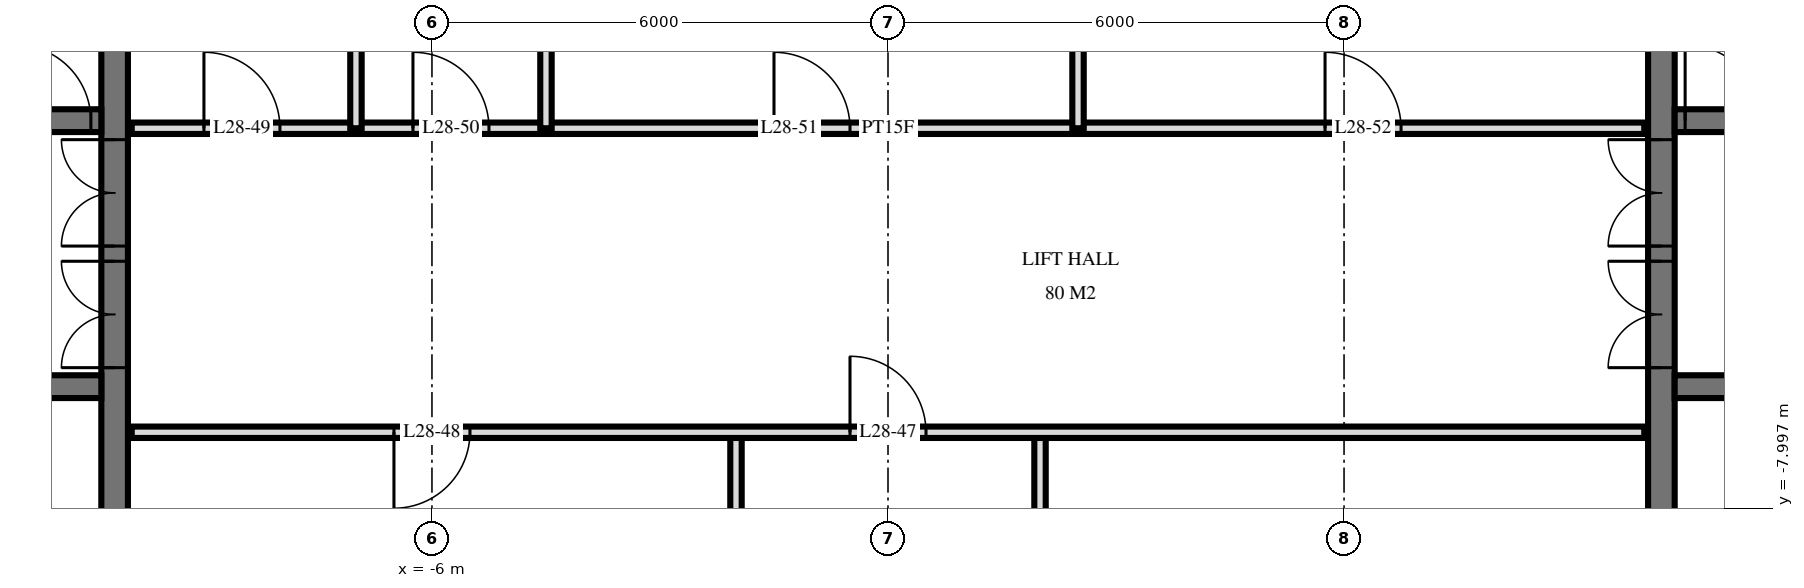
"""IFC4 building model, lengths in metres.
Left out: names, types, materials, properties, quantities, classifications, styles, units other than length and angle.
Written with IfcOpenShell. Run it as: python <this file> out.ifc"""

import sys

from ifc_helpers import new_model, si_unit, direction, frame, frame_2d, origin, place, context, subcontext, project, spatial, rectangle, extrude, element, fill, save


model = new_model("IFC4")
c1 = context("Model", 3, precision=1e-05, world=origin(), true_north=direction((0.0, 1.0)))
c2 = subcontext(c1, "Body", "Model", "MODEL_VIEW")
j1 = project(units=[si_unit("LENGTHUNIT", "METRE"), si_unit("PLANEANGLEUNIT", "RADIAN")], contexts=[c1])
p1 = place(None, origin())
s1 = spatial("IfcSite", under=j1, at=p1, CompositionType="ELEMENT")
p2 = place(p1, origin())
s2 = spatial("IfcBuilding", under=s1, at=p2, CompositionType="ELEMENT")
p3 = place(p2, frame((0.0, 0.0, 112.8)))
s3 = spatial("IfcBuildingStorey", under=s2, at=p3, CompositionType="ELEMENT", Elevation=112.8)
p4 = place(p3, frame((-10.175, -14.55, 0.0), z_axis=(0.0, 0.0, 1.0), x_axis=(0.0, 1.0, 0.0)))
e1 = element("IfcWall", 1, at=p4, inside=s3, PredefinedType="SHEAR", context=c2, shape_type="SweptSolid", body=[
    extrude(rectangle(XDim=14.1, YDim=0.35, at=frame_2d((7.05, 0.0))), origin(), (0.0, 0.0, 1.0), 3.6),
])
p5 = place(p4, frame((8.4, 0.0, 0.0)))
e2 = element("IfcOpeningElement", 2, at=p5, cuts=e1, PredefinedType="OPENING", context=c2, shape_type="SweptSolid", body=[
    extrude(rectangle(XDim=1.4, YDim=2.4, at=frame_2d((0.7, 1.2))), frame((0.0, 0.185, 0.0), z_axis=(0.0, -1.0, 0.0), x_axis=(1.0, 0.0, 0.0)), (0.0, 0.0, 1.0), 0.37),
])
p6 = place(p4, frame((10.0, 0.0, 0.0)))
e3 = element("IfcOpeningElement", 3, at=p6, cuts=e1, PredefinedType="OPENING", context=c2, shape_type="SweptSolid", body=[
    extrude(rectangle(XDim=1.4, YDim=2.4, at=frame_2d((0.7, 1.2))), frame((0.0, 0.185, 0.0), z_axis=(0.0, -1.0, 0.0), x_axis=(1.0, 0.0, 0.0)), (0.0, 0.0, 1.0), 0.37),
])
p7 = place(p4, frame((4.0, 0.0, 0.0)))
e4 = element("IfcOpeningElement", 4, at=p7, cuts=e1, PredefinedType="OPENING", context=c2, shape_type="SweptSolid", body=[
    extrude(rectangle(XDim=1.2, YDim=2.1, at=frame_2d((0.6, 1.05))), frame((0.0, 0.185, 0.0), z_axis=(0.0, -1.0, 0.0), x_axis=(1.0, 0.0, 0.0)), (0.0, 0.0, 1.0), 0.37),
])
p8 = place(p3, frame((-24.05, -2.9, 0.0), z_axis=(0.0, 0.0, 1.0), x_axis=(1.0, 0.0, 0.0)))
e5 = element("IfcWall", 5, at=p8, inside=s3, PredefinedType="SHEAR", context=c2, shape_type="SweptSolid", body=[
    extrude(rectangle(XDim=13.7, YDim=0.3, at=frame_2d((6.85, 0.0))), origin(), (0.0, 0.0, 1.0), 3.6),
])
p9 = place(p8, frame((0.55, 0.0, 0.0)))
e6 = element("IfcOpeningElement", 6, at=p9, cuts=e5, PredefinedType="OPENING", context=c2, shape_type="SweptSolid", body=[
    extrude(rectangle(XDim=1.1, YDim=2.1, at=frame_2d((0.55, 1.05))), frame((0.0, 0.16, 0.0), z_axis=(0.0, -1.0, 0.0), x_axis=(1.0, 0.0, 0.0)), (0.0, 0.0, 1.0), 0.32),
])
p10 = place(p8, frame((6.613, 0.0, 0.0)))
e7 = element("IfcOpeningElement", 7, at=p10, cuts=e5, PredefinedType="OPENING", context=c2, shape_type="SweptSolid", body=[
    extrude(rectangle(XDim=0.9, YDim=2.1, at=frame_2d((0.45, 1.05))), frame((0.0, 0.16, 0.0), z_axis=(0.0, -1.0, 0.0), x_axis=(1.0, 0.0, 0.0)), (0.0, 0.0, 1.0), 0.32),
])
p11 = place(p8, frame((5.188, 0.0, 0.0)))
e8 = element("IfcOpeningElement", 8, at=p11, cuts=e5, PredefinedType="OPENING", context=c2, shape_type="SweptSolid", body=[
    extrude(rectangle(XDim=0.9, YDim=2.1, at=frame_2d((0.45, 1.05))), frame((0.0, 0.16, 0.0), z_axis=(0.0, -1.0, 0.0), x_axis=(1.0, 0.0, 0.0)), (0.0, 0.0, 1.0), 0.32),
])
p12 = place(p8, frame((12.562, 0.0, 0.0)))
e9 = element("IfcOpeningElement", 9, at=p12, cuts=e5, PredefinedType="OPENING", context=c2, shape_type="SweptSolid", body=[
    extrude(rectangle(XDim=1.0, YDim=2.1, at=frame_2d((0.5, 1.05))), frame((0.0, 0.16, 0.0), z_axis=(0.0, -1.0, 0.0), x_axis=(1.0, 0.0, 0.0)), (0.0, 0.0, 1.0), 0.32),
])
p13 = place(p8, frame((11.137, 0.0, 0.0)))
e10 = element("IfcOpeningElement", 10, at=p13, cuts=e5, PredefinedType="OPENING", context=c2, shape_type="SweptSolid", body=[
    extrude(rectangle(XDim=1.0, YDim=2.1, at=frame_2d((0.5, 1.05))), frame((0.0, 0.16, 0.0), z_axis=(0.0, -1.0, 0.0), x_axis=(1.0, 0.0, 0.0)), (0.0, 0.0, 1.0), 0.32),
])
p14 = place(p8, frame((8.85, 0.0, 0.0)))
e11 = element("IfcOpeningElement", 11, at=p14, cuts=e5, PredefinedType="OPENING", context=c2, shape_type="SweptSolid", body=[
    extrude(rectangle(XDim=1.0, YDim=2.1, at=frame_2d((0.5, 1.05))), frame((0.0, 0.16, 0.0), z_axis=(0.0, -1.0, 0.0), x_axis=(1.0, 0.0, 0.0)), (0.0, 0.0, 1.0), 0.32),
])
p15 = place(p8, frame((3.0, 0.0, 0.0)))
e12 = element("IfcOpeningElement", 12, at=p15, cuts=e5, PredefinedType="OPENING", context=c2, shape_type="SweptSolid", body=[
    extrude(rectangle(XDim=1.0, YDim=2.1, at=frame_2d((0.5, 1.05))), frame((0.0, 0.16, 0.0), z_axis=(0.0, -1.0, 0.0), x_axis=(1.0, 0.0, 0.0)), (0.0, 0.0, 1.0), 0.32),
])
p16 = place(p3, frame((-24.05, -6.4, 0.0), z_axis=(0.0, 0.0, 1.0), x_axis=(1.0, 0.0, 0.0)))
e13 = element("IfcWall", 13, at=p16, inside=s3, PredefinedType="SHEAR", context=c2, shape_type="SweptSolid", body=[
    extrude(rectangle(XDim=13.7, YDim=0.3, at=frame_2d((6.85, 0.0))), origin(), (0.0, 0.0, 1.0), 3.6),
])
p17 = place(p16, frame((0.55, 0.0, 0.0)))
e14 = element("IfcOpeningElement", 14, at=p17, cuts=e13, PredefinedType="OPENING", context=c2, shape_type="SweptSolid", body=[
    extrude(rectangle(XDim=1.1, YDim=2.1, at=frame_2d((0.55, 1.05))), frame((0.0, 0.16, 0.0), z_axis=(0.0, -1.0, 0.0), x_axis=(1.0, 0.0, 0.0)), (0.0, 0.0, 1.0), 0.32),
])
p18 = place(p16, frame((5.8, 0.0, 0.0)))
e15 = element("IfcOpeningElement", 15, at=p18, cuts=e13, PredefinedType="OPENING", context=c2, shape_type="SweptSolid", body=[
    extrude(rectangle(XDim=1.1, YDim=2.1, at=frame_2d((0.55, 1.05))), frame((0.0, 0.16, 0.0), z_axis=(0.0, -1.0, 0.0), x_axis=(1.0, 0.0, 0.0)), (0.0, 0.0, 1.0), 0.32),
])
p19 = place(p3, frame((10.175, -14.55, 0.0), z_axis=(0.0, 0.0, 1.0), x_axis=(0.0, 1.0, 0.0)))
e16 = element("IfcWall", 16, at=p19, inside=s3, PredefinedType="SHEAR", context=c2, shape_type="SweptSolid", body=[
    extrude(rectangle(XDim=14.1, YDim=0.35, at=frame_2d((7.05, 0.0))), origin(), (0.0, 0.0, 1.0), 3.6),
])
p20 = place(p19, frame((8.4, 0.0, 0.0)))
e17 = element("IfcOpeningElement", 17, at=p20, cuts=e16, PredefinedType="OPENING", context=c2, shape_type="SweptSolid", body=[
    extrude(rectangle(XDim=1.4, YDim=2.4, at=frame_2d((0.7, 1.2))), frame((0.0, 0.185, 0.0), z_axis=(0.0, -1.0, 0.0), x_axis=(1.0, 0.0, 0.0)), (0.0, 0.0, 1.0), 0.37),
])
p21 = place(p19, frame((10.0, 0.0, 0.0)))
e18 = element("IfcOpeningElement", 18, at=p21, cuts=e16, PredefinedType="OPENING", context=c2, shape_type="SweptSolid", body=[
    extrude(rectangle(XDim=1.4, YDim=2.4, at=frame_2d((0.7, 1.2))), frame((0.0, 0.185, 0.0), z_axis=(0.0, -1.0, 0.0), x_axis=(1.0, 0.0, 0.0)), (0.0, 0.0, 1.0), 0.37),
])
p22 = place(p19, frame((4.0, 0.0, 0.0)))
e19 = element("IfcOpeningElement", 19, at=p22, cuts=e16, PredefinedType="OPENING", context=c2, shape_type="SweptSolid", body=[
    extrude(rectangle(XDim=1.2, YDim=2.1, at=frame_2d((0.6, 1.05))), frame((0.0, 0.185, 0.0), z_axis=(0.0, -1.0, 0.0), x_axis=(1.0, 0.0, 0.0)), (0.0, 0.0, 1.0), 0.37),
])
p23 = place(p3, frame((10.35, -2.9, 0.0), z_axis=(0.0, 0.0, 1.0), x_axis=(1.0, 0.0, 0.0)))
e20 = element("IfcWall", 20, at=p23, inside=s3, PredefinedType="SHEAR", context=c2, shape_type="SweptSolid", body=[
    extrude(rectangle(XDim=13.7, YDim=0.3, at=frame_2d((6.85, 0.0))), origin(), (0.0, 0.0, 1.0), 3.6),
])
p24 = place(p23, frame((12.05, 0.0, 0.0)))
e21 = element("IfcOpeningElement", 21, at=p24, cuts=e20, PredefinedType="OPENING", context=c2, shape_type="SweptSolid", body=[
    extrude(rectangle(XDim=1.1, YDim=2.1, at=frame_2d((0.55, 1.05))), frame((0.0, 0.16, 0.0), z_axis=(0.0, -1.0, 0.0), x_axis=(1.0, 0.0, 0.0)), (0.0, 0.0, 1.0), 0.32),
])
p25 = place(p23, frame((6.188, 0.0, 0.0)))
e22 = element("IfcOpeningElement", 22, at=p25, cuts=e20, PredefinedType="OPENING", context=c2, shape_type="SweptSolid", body=[
    extrude(rectangle(XDim=0.9, YDim=2.1, at=frame_2d((0.45, 1.05))), frame((0.0, 0.16, 0.0), z_axis=(0.0, -1.0, 0.0), x_axis=(1.0, 0.0, 0.0)), (0.0, 0.0, 1.0), 0.32),
])
p26 = place(p23, frame((7.613, 0.0, 0.0)))
e23 = element("IfcOpeningElement", 23, at=p26, cuts=e20, PredefinedType="OPENING", context=c2, shape_type="SweptSolid", body=[
    extrude(rectangle(XDim=0.9, YDim=2.1, at=frame_2d((0.45, 1.05))), frame((0.0, 0.16, 0.0), z_axis=(0.0, -1.0, 0.0), x_axis=(1.0, 0.0, 0.0)), (0.0, 0.0, 1.0), 0.32),
])
p27 = place(p23, frame((0.137, 0.0, 0.0)))
e24 = element("IfcOpeningElement", 24, at=p27, cuts=e20, PredefinedType="OPENING", context=c2, shape_type="SweptSolid", body=[
    extrude(rectangle(XDim=1.0, YDim=2.1, at=frame_2d((0.5, 1.05))), frame((0.0, 0.16, 0.0), z_axis=(0.0, -1.0, 0.0), x_axis=(1.0, 0.0, 0.0)), (0.0, 0.0, 1.0), 0.32),
])
p28 = place(p23, frame((1.562, 0.0, 0.0)))
e25 = element("IfcOpeningElement", 25, at=p28, cuts=e20, PredefinedType="OPENING", context=c2, shape_type="SweptSolid", body=[
    extrude(rectangle(XDim=1.0, YDim=2.1, at=frame_2d((0.5, 1.05))), frame((0.0, 0.16, 0.0), z_axis=(0.0, -1.0, 0.0), x_axis=(1.0, 0.0, 0.0)), (0.0, 0.0, 1.0), 0.32),
])
p29 = place(p23, frame((3.85, 0.0, 0.0)))
e26 = element("IfcOpeningElement", 26, at=p29, cuts=e20, PredefinedType="OPENING", context=c2, shape_type="SweptSolid", body=[
    extrude(rectangle(XDim=1.0, YDim=2.1, at=frame_2d((0.5, 1.05))), frame((0.0, 0.16, 0.0), z_axis=(0.0, -1.0, 0.0), x_axis=(1.0, 0.0, 0.0)), (0.0, 0.0, 1.0), 0.32),
])
p30 = place(p23, frame((9.7, 0.0, 0.0)))
e27 = element("IfcOpeningElement", 27, at=p30, cuts=e20, PredefinedType="OPENING", context=c2, shape_type="SweptSolid", body=[
    extrude(rectangle(XDim=1.0, YDim=2.1, at=frame_2d((0.5, 1.05))), frame((0.0, 0.16, 0.0), z_axis=(0.0, -1.0, 0.0), x_axis=(1.0, 0.0, 0.0)), (0.0, 0.0, 1.0), 0.32),
])
p31 = place(p3, frame((10.35, -6.4, 0.0), z_axis=(0.0, 0.0, 1.0), x_axis=(1.0, 0.0, 0.0)))
e28 = element("IfcWall", 28, at=p31, inside=s3, PredefinedType="SHEAR", context=c2, shape_type="SweptSolid", body=[
    extrude(rectangle(XDim=13.7, YDim=0.3, at=frame_2d((6.85, 0.0))), origin(), (0.0, 0.0, 1.0), 3.6),
])
p32 = place(p31, frame((12.05, 0.0, 0.0)))
e29 = element("IfcOpeningElement", 29, at=p32, cuts=e28, PredefinedType="OPENING", context=c2, shape_type="SweptSolid", body=[
    extrude(rectangle(XDim=1.1, YDim=2.1, at=frame_2d((0.55, 1.05))), frame((0.0, 0.16, 0.0), z_axis=(0.0, -1.0, 0.0), x_axis=(1.0, 0.0, 0.0)), (0.0, 0.0, 1.0), 0.32),
])
p33 = place(p31, frame((6.8, 0.0, 0.0)))
e30 = element("IfcOpeningElement", 30, at=p33, cuts=e28, PredefinedType="OPENING", context=c2, shape_type="SweptSolid", body=[
    extrude(rectangle(XDim=1.1, YDim=2.1, at=frame_2d((0.55, 1.05))), frame((0.0, 0.16, 0.0), z_axis=(0.0, -1.0, 0.0), x_axis=(1.0, 0.0, 0.0)), (0.0, 0.0, 1.0), 0.32),
])
p34 = place(p3, frame((2.5, -3.0, 0.0), z_axis=(0.0, 0.0, 1.0), x_axis=(0.0, 1.0, 0.0)))
e31 = element("IfcWall", 31, at=p34, inside=s3, PredefinedType="PARTITIONING", context=c2, shape_type="SweptSolid", body=[
    extrude(rectangle(XDim=4.02, YDim=0.15, at=frame_2d((2.01, 0.0))), origin(), (0.0, 0.0, 1.0), 3.32),
])
for number, where, z_axis, x_axis in (
    (32, (2.0, -11.0, 0.0), (0.0, 0.0, 1.0), (0.0, 1.0, 0.0)),
    (33, (-2.0, -11.0, 0.0), (0.0, 0.0, 1.0), (0.0, 1.0, 0.0)),
):
    element("IfcWall", number, at=place(p3, frame(where, z_axis=z_axis, x_axis=x_axis)), inside=s3, PredefinedType="PARTITIONING", context=c2, shape_type="SweptSolid", body=[
        extrude(rectangle(XDim=4.0, YDim=0.15, at=frame_2d((2.0, 0.0))), origin(), (0.0, 0.0, 1.0), 3.32),
    ])
for number, where, z_axis, x_axis in (
    (34, (-4.5, -3.0, 0.0), (0.0, 0.0, 1.0), (0.0, 1.0, 0.0)),
    (35, (-7.0, -3.0, 0.0), (0.0, 0.0, 1.0), (0.0, 1.0, 0.0)),
):
    element("IfcWall", number, at=place(p3, frame(where, z_axis=z_axis, x_axis=x_axis)), inside=s3, PredefinedType="PLUMBINGWALL", context=c2, shape_type="SweptSolid", body=[
        extrude(rectangle(XDim=4.02, YDim=0.15, at=frame_2d((2.01, 0.0))), origin(), (0.0, 0.0, 1.0), 3.32),
    ])
p35 = place(p3, frame((-9.95, -7.0, 0.0), z_axis=(0.0, 0.0, 1.0), x_axis=(1.0, 0.0, 0.0)))
e36 = element("IfcWall", 36, at=p35, inside=s3, PredefinedType="PARTITIONING", context=c2, shape_type="SweptSolid", body=[
    extrude(rectangle(XDim=19.9, YDim=0.15, at=frame_2d((9.95, 0.0))), origin(), (0.0, 0.0, 1.0), 3.32),
])
p36 = place(p35, frame((9.45, 0.0, 0.0)))
e37 = element("IfcOpeningElement", 37, at=p36, cuts=e36, PredefinedType="OPENING", context=c2, shape_type="SweptSolid", body=[
    extrude(rectangle(XDim=1.0, YDim=2.1, at=frame_2d((0.5, 1.05))), frame((0.0, 0.085, 0.0), z_axis=(0.0, -1.0, 0.0), x_axis=(1.0, 0.0, 0.0)), (0.0, 0.0, 1.0), 0.17),
])
p37 = place(p35, frame((3.45, 0.0, 0.0)))
e38 = element("IfcOpeningElement", 38, at=p37, cuts=e36, PredefinedType="OPENING", context=c2, shape_type="SweptSolid", body=[
    extrude(rectangle(XDim=1.0, YDim=2.1, at=frame_2d((0.5, 1.05))), frame((0.0, 0.085, 0.0), z_axis=(0.0, -1.0, 0.0), x_axis=(1.0, 0.0, 0.0)), (0.0, 0.0, 1.0), 0.17),
])
p38 = place(p3, frame((-9.95, -3.0, 0.0), z_axis=(0.0, 0.0, 1.0), x_axis=(1.0, 0.0, 0.0)))
e39 = element("IfcWall", 39, at=p38, inside=s3, PredefinedType="PARTITIONING", context=c2, shape_type="SweptSolid", body=[
    extrude(rectangle(XDim=19.9, YDim=0.15, at=frame_2d((9.95, 0.0))), origin(), (0.0, 0.0, 1.0), 3.32),
])
p39 = place(p38, frame((0.95, 0.0, 0.0)))
e40 = element("IfcOpeningElement", 40, at=p39, cuts=e39, PredefinedType="OPENING", context=c2, shape_type="SweptSolid", body=[
    extrude(rectangle(XDim=1.0, YDim=2.1, at=frame_2d((0.5, 1.05))), frame((0.0, 0.085, 0.0), z_axis=(0.0, -1.0, 0.0), x_axis=(1.0, 0.0, 0.0)), (0.0, 0.0, 1.0), 0.17),
])
p40 = place(p38, frame((3.7, 0.0, 0.0)))
e41 = element("IfcOpeningElement", 41, at=p40, cuts=e39, PredefinedType="OPENING", context=c2, shape_type="SweptSolid", body=[
    extrude(rectangle(XDim=1.0, YDim=2.1, at=frame_2d((0.5, 1.05))), frame((0.0, 0.085, 0.0), z_axis=(0.0, -1.0, 0.0), x_axis=(1.0, 0.0, 0.0)), (0.0, 0.0, 1.0), 0.17),
])
p41 = place(p38, frame((8.45, 0.0, 0.0)))
e42 = element("IfcOpeningElement", 42, at=p41, cuts=e39, PredefinedType="OPENING", context=c2, shape_type="SweptSolid", body=[
    extrude(rectangle(XDim=1.0, YDim=2.1, at=frame_2d((0.5, 1.05))), frame((0.0, 0.085, 0.0), z_axis=(0.0, -1.0, 0.0), x_axis=(1.0, 0.0, 0.0)), (0.0, 0.0, 1.0), 0.17),
])
p42 = place(p38, frame((15.7, 0.0, 0.0)))
e43 = element("IfcOpeningElement", 43, at=p42, cuts=e39, PredefinedType="OPENING", context=c2, shape_type="SweptSolid", body=[
    extrude(rectangle(XDim=1.0, YDim=2.1, at=frame_2d((0.5, 1.05))), frame((0.0, 0.085, 0.0), z_axis=(0.0, -1.0, 0.0), x_axis=(1.0, 0.0, 0.0)), (0.0, 0.0, 1.0), 0.17),
])
p43 = place(p5, origin())
e44 = element("IfcDoor", 44, at=p43, inside=s3, OperationType="DOUBLE_DOOR_SINGLE_SWING", PredefinedType="DOOR", context=c2, shape_type="SweptSolid", body=[
    extrude(rectangle(XDim=1.4, YDim=2.4, at=frame_2d((0.7, 1.2))), frame((0.0, 0.025, 0.0), z_axis=(0.0, -1.0, 0.0), x_axis=(1.0, 0.0, 0.0)), (0.0, 0.0, 1.0), 0.05),
])
fill(e2, e44)
p44 = place(p6, origin())
e45 = element("IfcDoor", 45, at=p44, inside=s3, OperationType="DOUBLE_DOOR_SINGLE_SWING", PredefinedType="DOOR", context=c2, shape_type="SweptSolid", body=[
    extrude(rectangle(XDim=1.4, YDim=2.4, at=frame_2d((0.7, 1.2))), frame((0.0, 0.025, 0.0), z_axis=(0.0, -1.0, 0.0), x_axis=(1.0, 0.0, 0.0)), (0.0, 0.0, 1.0), 0.05),
])
fill(e3, e45)
p45 = place(p12, origin())
e46 = element("IfcDoor", 46, at=p45, inside=s3, OperationType="SINGLE_SWING_RIGHT", PredefinedType="DOOR", context=c2, shape_type="SweptSolid", body=[
    extrude(rectangle(XDim=1.0, YDim=2.1, at=frame_2d((0.5, 1.05))), frame((0.0, 0.025, 0.0), z_axis=(0.0, -1.0, 0.0), x_axis=(1.0, 0.0, 0.0)), (0.0, 0.0, 1.0), 0.05),
])
fill(e9, e46)
p46 = place(p20, origin())
e47 = element("IfcDoor", 47, at=p46, inside=s3, OperationType="DOUBLE_DOOR_SINGLE_SWING", PredefinedType="DOOR", context=c2, shape_type="SweptSolid", body=[
    extrude(rectangle(XDim=1.4, YDim=2.4, at=frame_2d((0.7, 1.2))), frame((0.0, 0.025, 0.0), z_axis=(0.0, -1.0, 0.0), x_axis=(1.0, 0.0, 0.0)), (0.0, 0.0, 1.0), 0.05),
])
fill(e17, e47)
p47 = place(p21, origin())
e48 = element("IfcDoor", 48, at=p47, inside=s3, OperationType="DOUBLE_DOOR_SINGLE_SWING", PredefinedType="DOOR", context=c2, shape_type="SweptSolid", body=[
    extrude(rectangle(XDim=1.4, YDim=2.4, at=frame_2d((0.7, 1.2))), frame((0.0, 0.025, 0.0), z_axis=(0.0, -1.0, 0.0), x_axis=(1.0, 0.0, 0.0)), (0.0, 0.0, 1.0), 0.05),
])
fill(e18, e48)
p48 = place(p27, origin())
e49 = element("IfcDoor", 49, at=p48, inside=s3, OperationType="SINGLE_SWING_RIGHT", PredefinedType="DOOR", context=c2, shape_type="SweptSolid", body=[
    extrude(rectangle(XDim=1.0, YDim=2.1, at=frame_2d((0.5, 1.05))), frame((0.0, 0.025, 0.0), z_axis=(0.0, -1.0, 0.0), x_axis=(1.0, 0.0, 0.0)), (0.0, 0.0, 1.0), 0.05),
])
fill(e24, e49)
p49 = place(p36, origin())
e50 = element("IfcDoor", 50, at=p49, inside=s3, OperationType="SINGLE_SWING_RIGHT", PredefinedType="DOOR", context=c2, shape_type="SweptSolid", body=[
    extrude(rectangle(XDim=1.0, YDim=2.1, at=frame_2d((0.5, 1.05))), frame((0.0, 0.025, 0.0), z_axis=(0.0, -1.0, 0.0), x_axis=(1.0, 0.0, 0.0)), (0.0, 0.0, 1.0), 0.05),
])
fill(e37, e50)
p50 = place(p37, frame((0.5, 0.0, 0.0), z_axis=(0.0, 0.0, 1.0), x_axis=(-1.0, 0.0, 0.0)))
e51 = element("IfcDoor", 51, at=p50, inside=s3, OperationType="SINGLE_SWING_LEFT", PredefinedType="DOOR", context=c2, shape_type="SweptSolid", body=[
    extrude(rectangle(XDim=1.0, YDim=2.1, at=frame_2d((0.0, 1.05))), frame((0.0, -0.025, 0.0), z_axis=(0.0, 1.0, 0.0), x_axis=(-1.0, 0.0, 0.0)), (0.0, 0.0, 1.0), 0.05),
])
fill(e38, e51)
p51 = place(p39, origin())
e52 = element("IfcDoor", 52, at=p51, inside=s3, OperationType="SINGLE_SWING_RIGHT", PredefinedType="DOOR", context=c2, shape_type="SweptSolid", body=[
    extrude(rectangle(XDim=1.0, YDim=2.1, at=frame_2d((0.5, 1.05))), frame((0.0, 0.025, 0.0), z_axis=(0.0, -1.0, 0.0), x_axis=(1.0, 0.0, 0.0)), (0.0, 0.0, 1.0), 0.05),
])
fill(e40, e52)
p52 = place(p40, origin())
e53 = element("IfcDoor", 53, at=p52, inside=s3, OperationType="SINGLE_SWING_RIGHT", PredefinedType="DOOR", context=c2, shape_type="SweptSolid", body=[
    extrude(rectangle(XDim=1.0, YDim=2.1, at=frame_2d((0.5, 1.05))), frame((0.0, 0.025, 0.0), z_axis=(0.0, -1.0, 0.0), x_axis=(1.0, 0.0, 0.0)), (0.0, 0.0, 1.0), 0.05),
])
fill(e41, e53)
p53 = place(p41, origin())
e54 = element("IfcDoor", 54, at=p53, inside=s3, OperationType="SINGLE_SWING_RIGHT", PredefinedType="DOOR", context=c2, shape_type="SweptSolid", body=[
    extrude(rectangle(XDim=1.0, YDim=2.1, at=frame_2d((0.5, 1.05))), frame((0.0, 0.025, 0.0), z_axis=(0.0, -1.0, 0.0), x_axis=(1.0, 0.0, 0.0)), (0.0, 0.0, 1.0), 0.05),
])
fill(e42, e54)
p54 = place(p42, origin())
e55 = element("IfcDoor", 55, at=p54, inside=s3, OperationType="SINGLE_SWING_RIGHT", PredefinedType="DOOR", context=c2, shape_type="SweptSolid", body=[
    extrude(rectangle(XDim=1.0, YDim=2.1, at=frame_2d((0.5, 1.05))), frame((0.0, 0.025, 0.0), z_axis=(0.0, -1.0, 0.0), x_axis=(1.0, 0.0, 0.0)), (0.0, 0.0, 1.0), 0.05),
])
fill(e43, e55)
save(model, sys.argv[1])
